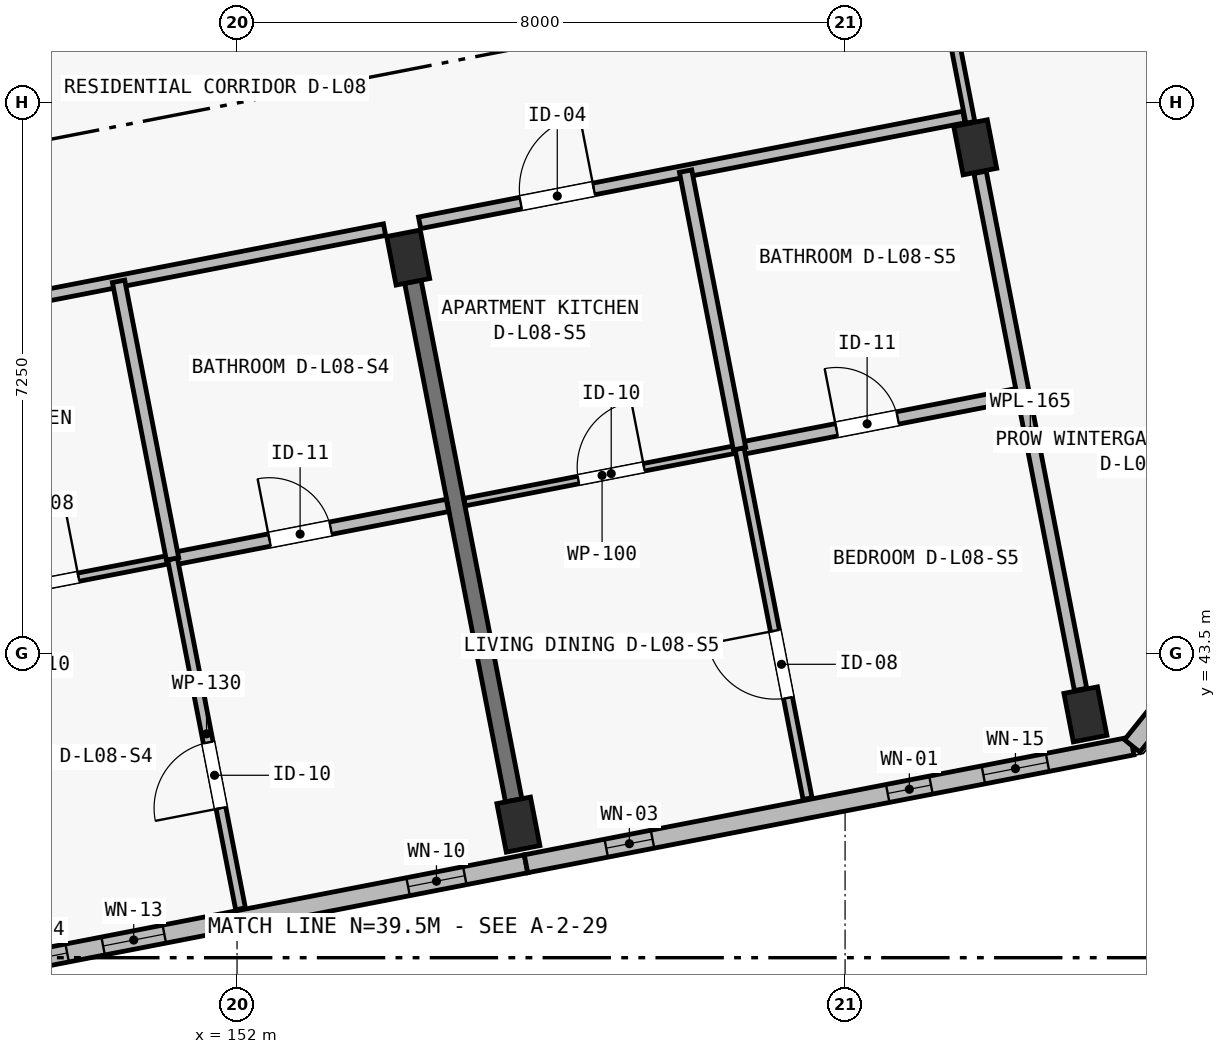
"""IFC4 building model, lengths in metres.
Left out: names, types, materials, properties, quantities, classifications, styles, units other than length and angle.
Written with IfcOpenShell. Run it as: python <this file> out.ifc"""

import sys

from ifc_helpers import new_model, si_unit, direction, frame, frame_2d, origin, origin_2d, place, context, subcontext, project, spatial, polyline, rectangle, outline, extrude, element, fill, save


model = new_model("IFC4")
c1 = context("Model", 3, precision=1e-05, world=origin(), true_north=direction((0.0, 1.0)))
c2 = subcontext(c1, "Body", "Model", "MODEL_VIEW")
j1 = project(units=[si_unit("LENGTHUNIT", "METRE"), si_unit("PLANEANGLEUNIT", "RADIAN")], contexts=[c1])
p1 = place(None, origin())
s1 = spatial("IfcSite", under=j1, at=p1, CompositionType="ELEMENT")
p2 = place(p1, origin())
s2 = spatial("IfcBuilding", under=s1, at=p2, CompositionType="ELEMENT")
p3 = place(p2, frame((0.0, 0.0, 27.9)))
s3 = spatial("IfcBuildingStorey", under=s2, at=p3, CompositionType="ELEMENT", Elevation=27.9)
for number, where, z_axis, x_axis in (
    (1, (155.702, 41.251, 0.0), (0.0, 0.0, 1.0), (0.982, 0.191, 0.0)),
    (2, (154.252, 48.711, 0.0), (0.0, 0.0, 1.0), (0.982, 0.191, 0.0)),
):
    element("IfcColumn", number, at=place(p3, frame(where, z_axis=z_axis, x_axis=x_axis)), inside=s3, PredefinedType="COLUMN", context=c2, shape_type="SweptSolid", body=[
        extrude(rectangle(XDim=0.45, YDim=0.65, at=origin_2d()), origin(), (0.0, 0.0, 1.0), 3.25),
    ])
for number, where, z_axis, x_axis in (
    (3, (163.162, 42.701, 0.0), (0.0, 0.0, 1.0), (0.982, 0.191, 0.0)),
    (4, (161.712, 50.161, 0.0), (0.0, 0.0, 1.0), (0.982, 0.191, 0.0)),
):
    element("IfcColumn", number, at=place(p3, frame(where, z_axis=z_axis, x_axis=x_axis)), inside=s3, PredefinedType="COLUMN", context=c2, shape_type="SweptSolid", body=[
        extrude(rectangle(XDim=0.45, YDim=0.65, at=origin_2d()), origin(), (0.0, 0.0, 1.0), 7.468),
    ])
p4 = place(p3, frame((155.64, 41.57, 0.0), z_axis=(0.0, 0.0, 1.0), x_axis=(-0.190817005532, 0.981625626397, 0.0)))
e5 = element("IfcWall", 5, at=p4, inside=s3, PredefinedType="SHEAR", context=c2, shape_type="SweptSolid", body=[
    extrude(rectangle(XDim=6.95, YDim=0.22, at=frame_2d((3.475, 0.0))), origin(), (0.0, 0.0, 1.0), 2.5),
])
p5 = place(p3, frame((155.802, 40.735, 0.0), z_axis=(0.0, 0.0, 1.0), x_axis=(-0.981626422232, -0.190812911449, 0.0)))
e6 = element("IfcWall", 6, at=p5, inside=s3, PredefinedType="SOLIDWALL", context=c2, shape_type="SweptSolid", body=[
    extrude(outline(polyline([(0.0, 0.0), (7.6, 0.0), (7.6, 4.987), (0.0, 6.56), (0.0, 0.0)])), frame((0.0, 0.12, 0.0), z_axis=(0.0, -1.0, 0.0), x_axis=(1.0, 0.0, 0.0)), (0.0, 0.0, 1.0), 0.24),
])
p6 = place(p5, frame((0.82, 0.0, 0.42)))
e7 = element("IfcOpeningElement", 7, at=p6, cuts=e6, PredefinedType="OPENING", context=c2, shape_type="SweptSolid", body=[
    extrude(rectangle(XDim=0.76, YDim=2.34, at=frame_2d((0.38, 1.17))), frame((0.0, 0.135, 0.0), z_axis=(0.0, -1.0, 0.0), x_axis=(1.0, 0.0, 0.0)), (0.0, 0.0, 1.0), 0.27),
])
p7 = place(p5, frame((4.848, 0.0, 0.42)))
e8 = element("IfcOpeningElement", 8, at=p7, cuts=e6, PredefinedType="OPENING", context=c2, shape_type="SweptSolid", body=[
    extrude(rectangle(XDim=0.82, YDim=2.18, at=frame_2d((0.41, 1.09))), frame((0.0, 0.135, 0.0), z_axis=(0.0, -1.0, 0.0), x_axis=(1.0, 0.0, 0.0)), (0.0, 0.0, 1.0), 0.27),
])
p8 = place(p5, frame((6.15, 0.0, 0.48)))
e9 = element("IfcOpeningElement", 9, at=p8, cuts=e6, PredefinedType="OPENING", context=c2, shape_type="SweptSolid", body=[
    extrude(rectangle(XDim=0.84, YDim=2.28, at=frame_2d((0.42, 1.14))), frame((0.0, 0.135, 0.0), z_axis=(0.0, -1.0, 0.0), x_axis=(1.0, 0.0, 0.0)), (0.0, 0.0, 1.0), 0.27),
])
p9 = place(p3, frame((163.778, 42.286, 0.0), z_axis=(0.0, 0.0, 1.0), x_axis=(-0.981628367112, -0.190802905848, 0.0)))
e10 = element("IfcWall", 10, at=p9, inside=s3, PredefinedType="SOLIDWALL", context=c2, shape_type="SweptSolid", body=[
    extrude(outline(polyline([(0.0, 0.0), (8.125, 0.0), (8.125, 6.56), (0.0, 8.241), (0.0, 0.0)])), frame((0.0, 0.12, 0.0), z_axis=(0.0, -1.0, 0.0), x_axis=(1.0, 0.0, 0.0)), (0.0, 0.0, 1.0), 0.24),
])
p10 = place(p9, frame((1.135, 0.0, 0.48)))
e11 = element("IfcOpeningElement", 11, at=p10, cuts=e10, PredefinedType="OPENING", context=c2, shape_type="SweptSolid", body=[
    extrude(rectangle(XDim=0.86, YDim=2.36, at=frame_2d((0.43, 1.18))), frame((0.0, 0.135, 0.0), z_axis=(0.0, -1.0, 0.0), x_axis=(1.0, 0.0, 0.0)), (0.0, 0.0, 1.0), 0.27),
])
p11 = place(p9, frame((2.697, 0.0, 0.52)))
e12 = element("IfcOpeningElement", 12, at=p11, cuts=e10, PredefinedType="OPENING", context=c2, shape_type="SweptSolid", body=[
    extrude(rectangle(XDim=0.58, YDim=2.16, at=frame_2d((0.29, 1.08))), frame((0.0, 0.135, 0.0), z_axis=(0.0, -1.0, 0.0), x_axis=(1.0, 0.0, 0.0)), (0.0, 0.0, 1.0), 0.27),
])
p12 = place(p9, frame((6.43, 0.0, 0.48)))
e13 = element("IfcOpeningElement", 13, at=p12, cuts=e10, PredefinedType="OPENING", context=c2, shape_type="SweptSolid", body=[
    extrude(rectangle(XDim=0.62, YDim=2.28, at=frame_2d((0.31, 1.14))), frame((0.0, 0.135, 0.0), z_axis=(0.0, -1.0, 0.0), x_axis=(1.0, 0.0, 0.0)), (0.0, 0.0, 1.0), 0.27),
])
p13 = place(p3, frame((159.837, 62.556, 0.0), z_axis=(0.0, 0.0, 1.0), x_axis=(0.389225507936, -0.921142499276, 0.0)))
e14 = element("IfcWall", 14, at=p13, inside=s3, PredefinedType="SOLIDWALL", context=c2, shape_type="SweptSolid", body=[
    extrude(outline(polyline([(0.0, 0.0), (17.91, 0.0), (17.91, 9.006), (0.0, 8.241), (0.0, 0.0)])), frame((0.0, 0.13, 0.0), z_axis=(0.0, -1.0, 0.0), x_axis=(1.0, 0.0, 0.0)), (0.0, 0.0, 1.0), 0.26),
])
p14 = place(p13, frame((2.45, 0.0, 0.45)))
e15 = element("IfcOpeningElement", 15, at=p14, cuts=e14, PredefinedType="OPENING", context=c2, shape_type="SweptSolid", body=[
    extrude(rectangle(XDim=0.72, YDim=2.16, at=frame_2d((0.36, 1.08))), frame((0.0, 0.145, 0.0), z_axis=(0.0, -1.0, 0.0), x_axis=(1.0, 0.0, 0.0)), (0.0, 0.0, 1.0), 0.29),
])
p15 = place(p13, frame((14.6, 0.0, 0.52)))
e16 = element("IfcOpeningElement", 16, at=p15, cuts=e14, PredefinedType="OPENING", context=c2, shape_type="SweptSolid", body=[
    extrude(rectangle(XDim=0.86, YDim=2.36, at=frame_2d((0.43, 1.18))), frame((0.0, 0.145, 0.0), z_axis=(0.0, -1.0, 0.0), x_axis=(1.0, 0.0, 0.0)), (0.0, 0.0, 1.0), 0.29),
])
p16 = place(p3, frame((166.809, 46.058, 0.0), z_axis=(0.0, 0.0, 1.0), x_axis=(-0.626281072923, -0.779597343312, 0.0)))
e17 = element("IfcWall", 17, at=p16, inside=s3, PredefinedType="SOLIDWALL", context=c2, shape_type="SweptSolid", body=[
    extrude(outline(polyline([(0.0, 0.0), (4.839, 0.0), (4.839, 8.241), (0.0, 9.006), (0.0, 0.0)])), frame((0.0, 0.13, 0.0), z_axis=(0.0, -1.0, 0.0), x_axis=(1.0, 0.0, 0.0)), (0.0, 0.0, 1.0), 0.26),
])
p17 = place(p3, frame((161.648, 50.49, 0.0), z_axis=(0.0, 0.0, 1.0), x_axis=(-0.190789073686, 0.981631055622, 0.0)))
e18 = element("IfcWall", 18, at=p17, inside=s3, PredefinedType="PARTITIONING", context=c2, shape_type="SweptSolid", body=[
    extrude(rectangle(XDim=3.73, YDim=0.12, at=frame_2d((1.865, 0.0))), origin(), (0.0, 0.0, 1.0), 2.6),
])
p18 = place(p17, frame((1.35, 0.0, 0.0)))
e19 = element("IfcOpeningElement", 19, at=p18, cuts=e18, PredefinedType="OPENING", context=c2, shape_type="SweptSolid", body=[
    extrude(rectangle(XDim=0.88, YDim=2.1, at=frame_2d((0.44, 1.05))), frame((0.0, 0.075, 0.0), z_axis=(0.0, -1.0, 0.0), x_axis=(1.0, 0.0, 0.0)), (0.0, 0.0, 1.0), 0.15),
])
p19 = place(p3, frame((163.098, 43.03, 0.0), z_axis=(0.0, 0.0, 1.0), x_axis=(-0.190835713385, 0.981621989616, 0.0)))
e20 = element("IfcWall", 20, at=p19, inside=s3, PredefinedType="PLUMBINGWALL", context=c2, shape_type="SweptSolid", body=[
    extrude(rectangle(XDim=6.93, YDim=0.165, at=frame_2d((3.465, 0.0))), origin(), (0.0, 0.0, 1.0), 2.6),
])
p20 = place(p3, frame((146.942, 47.718, 0.0), z_axis=(0.0, 0.0, 1.0), x_axis=(0.981623942594, 0.190825667367, 0.0)))
e21 = element("IfcWall", 21, at=p20, inside=s3, PredefinedType="PARTITIONING", context=c2, shape_type="SweptSolid", body=[
    extrude(rectangle(XDim=7.13, YDim=0.155, at=frame_2d((3.565, 0.0))), origin(), (0.0, 0.0, 1.0), 3.15),
])
p21 = place(p20, frame((1.355, 0.0, 0.0)))
e22 = element("IfcOpeningElement", 22, at=p21, cuts=e21, PredefinedType="OPENING", context=c2, shape_type="SweptSolid", body=[
    extrude(rectangle(XDim=1.02, YDim=2.2, at=frame_2d((0.51, 1.1))), frame((0.0, 0.093, 0.0), z_axis=(0.0, -1.0, 0.0), x_axis=(1.0, 0.0, 0.0)), (0.0, 0.0, 1.0), 0.185),
])
p22 = place(p3, frame((147.534, 44.043, 0.0), z_axis=(0.0, 0.0, 1.0), x_axis=(0.981626422232, 0.190812911449, 0.0)))
e23 = element("IfcWall", 23, at=p22, inside=s3, PredefinedType="PARTITIONING", context=c2, shape_type="SweptSolid", body=[
    extrude(rectangle(XDim=3.685, YDim=0.11, at=frame_2d((1.842, 0.0))), origin(), (0.0, 0.0, 1.0), 3.15),
])
p23 = place(p22, frame((1.525, 0.0, 0.0)))
e24 = element("IfcOpeningElement", 24, at=p23, cuts=e23, PredefinedType="OPENING", context=c2, shape_type="SweptSolid", body=[
    extrude(rectangle(XDim=0.9, YDim=2.1, at=frame_2d((0.45, 1.05))), frame((0.0, 0.07, 0.0), z_axis=(0.0, -1.0, 0.0), x_axis=(1.0, 0.0, 0.0)), (0.0, 0.0, 1.0), 0.14),
])
p24 = place(p3, frame((151.151, 44.747, 0.0), z_axis=(0.0, 0.0, 1.0), x_axis=(0.981628834294, 0.190800502313, 0.0)))
e25 = element("IfcWall", 25, at=p24, inside=s3, PredefinedType="PLUMBINGWALL", context=c2, shape_type="SweptSolid", body=[
    extrude(rectangle(XDim=3.685, YDim=0.165, at=frame_2d((1.843, 0.0))), origin(), (0.0, 0.0, 1.0), 3.15),
])
p25 = place(p24, frame((1.3, 0.0, 0.0)))
e26 = element("IfcOpeningElement", 26, at=p25, cuts=e25, PredefinedType="OPENING", context=c2, shape_type="SweptSolid", body=[
    extrude(rectangle(XDim=0.82, YDim=2.08, at=frame_2d((0.41, 1.04))), frame((0.0, 0.097, 0.0), z_axis=(0.0, -1.0, 0.0), x_axis=(1.0, 0.0, 0.0)), (0.0, 0.0, 1.0), 0.195),
])
p26 = place(p3, frame((152.046, 40.143, 0.0), z_axis=(0.0, 0.0, 1.0), x_axis=(-0.190837612577, 0.981621620394, 0.0)))
e27 = element("IfcWall", 27, at=p26, inside=s3, PredefinedType="PARTITIONING", context=c2, shape_type="SweptSolid", body=[
    extrude(rectangle(XDim=4.69, YDim=0.13, at=frame_2d((2.345, 0.0))), origin(), (0.0, 0.0, 1.0), 3.15),
])
p27 = place(p26, frame((1.35, 0.0, 0.0)))
e28 = element("IfcOpeningElement", 28, at=p27, cuts=e27, PredefinedType="OPENING", context=c2, shape_type="SweptSolid", body=[
    extrude(rectangle(XDim=0.88, YDim=2.1, at=frame_2d((0.44, 1.05))), frame((0.0, 0.08, 0.0), z_axis=(0.0, -1.0, 0.0), x_axis=(1.0, 0.0, 0.0)), (0.0, 0.0, 1.0), 0.16),
])
p28 = place(p3, frame((151.151, 44.747, 0.0), z_axis=(0.0, 0.0, 1.0), x_axis=(-0.190774805453, 0.981633828678, 0.0)))
e29 = element("IfcWall", 29, at=p28, inside=s3, PredefinedType="PLUMBINGWALL", context=c2, shape_type="SweptSolid", body=[
    extrude(rectangle(XDim=3.72, YDim=0.165, at=frame_2d((1.86, 0.0))), origin(), (0.0, 0.0, 1.0), 3.15),
])
p29 = place(p3, frame((154.402, 49.168, 0.0), z_axis=(0.0, 0.0, 1.0), x_axis=(0.981623226858, 0.190829349137, 0.0)))
e30 = element("IfcWall", 30, at=p29, inside=s3, PredefinedType="PARTITIONING", context=c2, shape_type="SweptSolid", body=[
    extrude(rectangle(XDim=7.295, YDim=0.155, at=frame_2d((3.647, 0.0))), origin(), (0.0, 0.0, 1.0), 3.15),
])
p30 = place(p29, frame((1.355, 0.0, 0.0)))
e31 = element("IfcOpeningElement", 31, at=p30, cuts=e30, PredefinedType="OPENING", context=c2, shape_type="SweptSolid", body=[
    extrude(rectangle(XDim=0.98, YDim=2.15, at=frame_2d((0.49, 1.075))), frame((0.0, 0.093, 0.0), z_axis=(0.0, -1.0, 0.0), x_axis=(1.0, 0.0, 0.0)), (0.0, 0.0, 1.0), 0.185),
])
p31 = place(p3, frame((154.994, 45.494, 0.0), z_axis=(0.0, 0.0, 1.0), x_axis=(0.981628834294, 0.190800502313, 0.0)))
e32 = element("IfcWall", 32, at=p31, inside=s3, PredefinedType="PARTITIONING", context=c2, shape_type="SweptSolid", body=[
    extrude(rectangle(XDim=3.685, YDim=0.1, at=frame_2d((1.843, 0.0))), origin(), (0.0, 0.0, 1.0), 3.15),
])
p32 = place(p31, frame((1.525, 0.0, 0.0)))
e33 = element("IfcOpeningElement", 33, at=p32, cuts=e32, PredefinedType="OPENING", context=c2, shape_type="SweptSolid", body=[
    extrude(rectangle(XDim=0.88, YDim=2.1, at=frame_2d((0.44, 1.05))), frame((0.0, 0.065, 0.0), z_axis=(0.0, -1.0, 0.0), x_axis=(1.0, 0.0, 0.0)), (0.0, 0.0, 1.0), 0.13),
])
p33 = place(p3, frame((158.612, 46.197, 0.0), z_axis=(0.0, 0.0, 1.0), x_axis=(0.981621896267, 0.190836193549, 0.0)))
e34 = element("IfcWall", 34, at=p33, inside=s3, PredefinedType="PLUMBINGWALL", context=c2, shape_type="SweptSolid", body=[
    extrude(rectangle(XDim=3.71, YDim=0.165, at=frame_2d((1.855, 0.0))), origin(), (0.0, 0.0, 1.0), 3.15),
])
p34 = place(p33, frame((1.3, 0.0, 0.0)))
e35 = element("IfcOpeningElement", 35, at=p34, cuts=e34, PredefinedType="OPENING", context=c2, shape_type="SweptSolid", body=[
    extrude(rectangle(XDim=0.82, YDim=2.08, at=frame_2d((0.41, 1.04))), frame((0.0, 0.097, 0.0), z_axis=(0.0, -1.0, 0.0), x_axis=(1.0, 0.0, 0.0)), (0.0, 0.0, 1.0), 0.195),
])
p35 = place(p3, frame((159.506, 41.593, 0.0), z_axis=(0.0, 0.0, 1.0), x_axis=(-0.190787451574, 0.981631370893, 0.0)))
e36 = element("IfcWall", 36, at=p35, inside=s3, PredefinedType="PARTITIONING", context=c2, shape_type="SweptSolid", body=[
    extrude(rectangle(XDim=4.69, YDim=0.12, at=frame_2d((2.345, 0.0))), origin(), (0.0, 0.0, 1.0), 3.15),
])
p36 = place(p35, frame((1.35, 0.0, 0.0)))
e37 = element("IfcOpeningElement", 37, at=p36, cuts=e36, PredefinedType="OPENING", context=c2, shape_type="SweptSolid", body=[
    extrude(rectangle(XDim=0.9, YDim=2.1, at=frame_2d((0.45, 1.05))), frame((0.0, 0.075, 0.0), z_axis=(0.0, -1.0, 0.0), x_axis=(1.0, 0.0, 0.0)), (0.0, 0.0, 1.0), 0.15),
])
p37 = place(p3, frame((158.612, 46.197, 0.0), z_axis=(0.0, 0.0, 1.0), x_axis=(-0.190850336204, 0.981619146701, 0.0)))
e38 = element("IfcWall", 38, at=p37, inside=s3, PredefinedType="PLUMBINGWALL", context=c2, shape_type="SweptSolid", body=[
    extrude(rectangle(XDim=3.72, YDim=0.165, at=frame_2d((1.86, 0.0))), origin(), (0.0, 0.0, 1.0), 3.15),
])
p38 = place(p6, origin())
e39 = element("IfcWindow", 39, at=p38, inside=s3, PartitioningType="SINGLE_PANEL", PredefinedType="WINDOW", context=c2, shape_type="SweptSolid", body=[
    extrude(rectangle(XDim=0.76, YDim=2.34, at=frame_2d((0.38, 1.17))), frame((0.0, 0.03, 0.0), z_axis=(0.0, -1.0, 0.0), x_axis=(1.0, 0.0, 0.0)), (0.0, 0.0, 1.0), 0.06),
])
fill(e7, e39)
p39 = place(p7, origin())
e40 = element("IfcWindow", 40, at=p39, inside=s3, PartitioningType="SINGLE_PANEL", PredefinedType="WINDOW", context=c2, shape_type="SweptSolid", body=[
    extrude(rectangle(XDim=0.82, YDim=2.18, at=frame_2d((0.41, 1.09))), frame((0.0, 0.03, 0.0), z_axis=(0.0, -1.0, 0.0), x_axis=(1.0, 0.0, 0.0)), (0.0, 0.0, 1.0), 0.06),
])
fill(e8, e40)
p40 = place(p8, origin())
e41 = element("IfcWindow", 41, at=p40, inside=s3, PartitioningType="SINGLE_PANEL", PredefinedType="WINDOW", context=c2, shape_type="SweptSolid", body=[
    extrude(rectangle(XDim=0.84, YDim=2.28, at=frame_2d((0.42, 1.14))), frame((0.0, 0.03, 0.0), z_axis=(0.0, -1.0, 0.0), x_axis=(1.0, 0.0, 0.0)), (0.0, 0.0, 1.0), 0.06),
])
fill(e9, e41)
p41 = place(p10, origin())
e42 = element("IfcWindow", 42, at=p41, inside=s3, PartitioningType="SINGLE_PANEL", PredefinedType="WINDOW", context=c2, shape_type="SweptSolid", body=[
    extrude(rectangle(XDim=0.86, YDim=2.36, at=frame_2d((0.43, 1.18))), frame((0.0, 0.03, 0.0), z_axis=(0.0, -1.0, 0.0), x_axis=(1.0, 0.0, 0.0)), (0.0, 0.0, 1.0), 0.06),
])
fill(e11, e42)
p42 = place(p11, origin())
e43 = element("IfcWindow", 43, at=p42, inside=s3, PartitioningType="SINGLE_PANEL", PredefinedType="WINDOW", context=c2, shape_type="SweptSolid", body=[
    extrude(rectangle(XDim=0.58, YDim=2.16, at=frame_2d((0.29, 1.08))), frame((0.0, 0.03, 0.0), z_axis=(0.0, -1.0, 0.0), x_axis=(1.0, 0.0, 0.0)), (0.0, 0.0, 1.0), 0.06),
])
fill(e12, e43)
p43 = place(p12, origin())
e44 = element("IfcWindow", 44, at=p43, inside=s3, PartitioningType="SINGLE_PANEL", PredefinedType="WINDOW", context=c2, shape_type="SweptSolid", body=[
    extrude(rectangle(XDim=0.62, YDim=2.28, at=frame_2d((0.31, 1.14))), frame((0.0, 0.03, 0.0), z_axis=(0.0, -1.0, 0.0), x_axis=(1.0, 0.0, 0.0)), (0.0, 0.0, 1.0), 0.06),
])
fill(e13, e44)
p44 = place(p23, origin())
e45 = element("IfcDoor", 45, at=p44, inside=s3, OperationType="SINGLE_SWING_RIGHT", PredefinedType="DOOR", context=c2, shape_type="SweptSolid", body=[
    extrude(rectangle(XDim=0.9, YDim=2.1, at=frame_2d((0.45, 1.05))), frame((0.0, 0.025, 0.0), z_axis=(0.0, -1.0, 0.0), x_axis=(1.0, 0.0, 0.0)), (0.0, 0.0, 1.0), 0.05),
])
fill(e24, e45)
p45 = place(p25, origin())
e46 = element("IfcDoor", 46, at=p45, inside=s3, OperationType="SINGLE_SWING_LEFT", PredefinedType="DOOR", context=c2, shape_type="SweptSolid", body=[
    extrude(rectangle(XDim=0.82, YDim=2.08, at=frame_2d((0.41, 1.04))), frame((0.0, 0.025, 0.0), z_axis=(0.0, -1.0, 0.0), x_axis=(1.0, 0.0, 0.0)), (0.0, 0.0, 1.0), 0.05),
])
fill(e26, e46)
p46 = place(p27, origin())
e47 = element("IfcDoor", 47, at=p46, inside=s3, OperationType="SINGLE_SWING_LEFT", PredefinedType="DOOR", context=c2, shape_type="SweptSolid", body=[
    extrude(rectangle(XDim=0.88, YDim=2.1, at=frame_2d((0.44, 1.05))), frame((0.0, 0.025, 0.0), z_axis=(0.0, -1.0, 0.0), x_axis=(1.0, 0.0, 0.0)), (0.0, 0.0, 1.0), 0.05),
])
fill(e28, e47)
p47 = place(p30, origin())
e48 = element("IfcDoor", 48, at=p47, inside=s3, OperationType="SINGLE_SWING_RIGHT", PredefinedType="DOOR", context=c2, shape_type="SweptSolid", body=[
    extrude(rectangle(XDim=0.98, YDim=2.15, at=frame_2d((0.49, 1.075))), frame((0.0, 0.025, 0.0), z_axis=(0.0, -1.0, 0.0), x_axis=(1.0, 0.0, 0.0)), (0.0, 0.0, 1.0), 0.05),
])
fill(e31, e48)
p48 = place(p32, origin())
e49 = element("IfcDoor", 49, at=p48, inside=s3, OperationType="SINGLE_SWING_RIGHT", PredefinedType="DOOR", context=c2, shape_type="SweptSolid", body=[
    extrude(rectangle(XDim=0.88, YDim=2.1, at=frame_2d((0.44, 1.05))), frame((0.0, 0.025, 0.0), z_axis=(0.0, -1.0, 0.0), x_axis=(1.0, 0.0, 0.0)), (0.0, 0.0, 1.0), 0.05),
])
fill(e33, e49)
p49 = place(p34, origin())
e50 = element("IfcDoor", 50, at=p49, inside=s3, OperationType="SINGLE_SWING_LEFT", PredefinedType="DOOR", context=c2, shape_type="SweptSolid", body=[
    extrude(rectangle(XDim=0.82, YDim=2.08, at=frame_2d((0.41, 1.04))), frame((0.0, 0.025, 0.0), z_axis=(0.0, -1.0, 0.0), x_axis=(1.0, 0.0, 0.0)), (0.0, 0.0, 1.0), 0.05),
])
fill(e35, e50)
p50 = place(p36, origin())
e51 = element("IfcDoor", 51, at=p50, inside=s3, OperationType="SINGLE_SWING_RIGHT", PredefinedType="DOOR", context=c2, shape_type="SweptSolid", body=[
    extrude(rectangle(XDim=0.9, YDim=2.1, at=frame_2d((0.45, 1.05))), frame((0.0, 0.025, 0.0), z_axis=(0.0, -1.0, 0.0), x_axis=(1.0, 0.0, 0.0)), (0.0, 0.0, 1.0), 0.05),
])
fill(e37, e51)
save(model, sys.argv[1])
